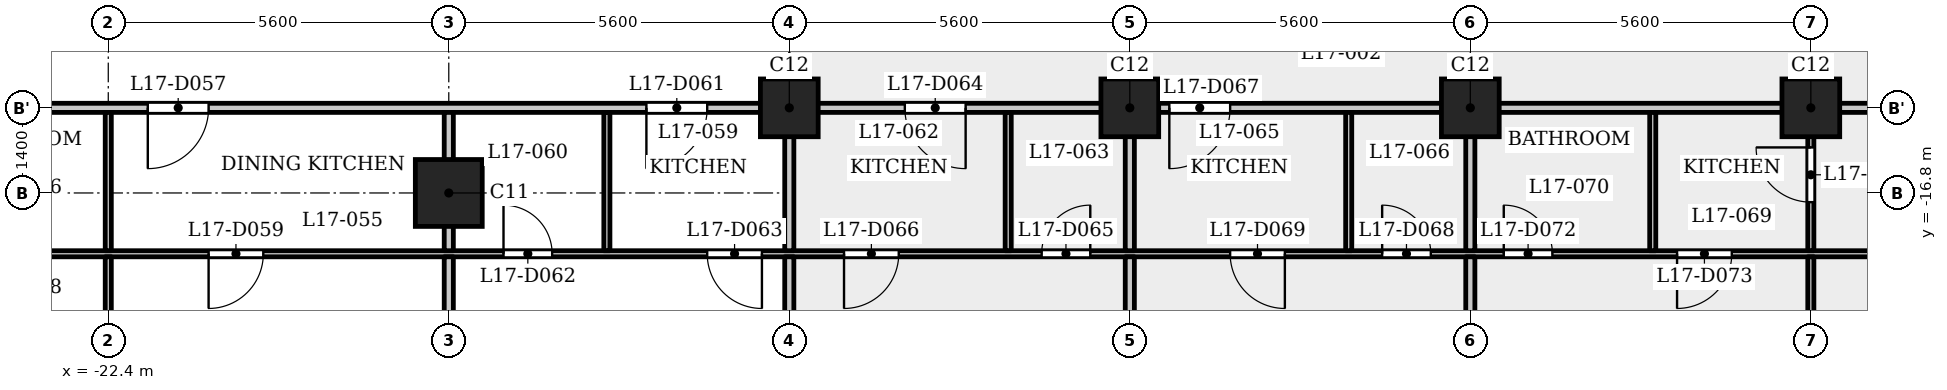
"""IFC4 building model, lengths in metres.
Left out: names, types, materials, properties, quantities, classifications, styles, units other than length and angle.
Written with IfcOpenShell. Run it as: python <this file> out.ifc"""

import sys

from ifc_helpers import new_model, si_unit, direction, frame, frame_2d, origin, origin_2d, place, context, subcontext, project, spatial, rectangle, extrude, element, fill, save


model = new_model("IFC4")
c1 = context("Model", 3, precision=1e-05, world=origin(), true_north=direction((0.0, 1.0)))
c2 = subcontext(c1, "Body", "Model", "MODEL_VIEW")
j1 = project(units=[si_unit("LENGTHUNIT", "METRE"), si_unit("PLANEANGLEUNIT", "RADIAN")], contexts=[c1])
p1 = place(None, origin())
s1 = spatial("IfcSite", under=j1, at=p1, CompositionType="ELEMENT")
p2 = place(p1, origin())
s2 = spatial("IfcBuilding", under=s1, at=p2, CompositionType="ELEMENT")
p3 = place(p2, frame((0.0, 0.0, 69.0)))
s3 = spatial("IfcBuildingStorey", under=s2, at=p3, CompositionType="ELEMENT", Elevation=69.0)
p4 = place(p3, frame((-16.8, -16.8, 0.0), z_axis=(0.0, 0.0, 1.0), x_axis=(1.0, 0.0, 0.0)))
e1 = element("IfcColumn", 1, at=p4, inside=s3, PredefinedType="COLUMN", context=c2, shape_type="SweptSolid", body=[
    extrude(rectangle(XDim=1.1, YDim=1.1, at=origin_2d()), origin(), (0.0, 0.0, 1.0), 3.5),
])
for number, where, z_axis, x_axis in (
    (2, (-11.2, -15.4, 0.0), (0.0, 0.0, 1.0), (1.0, 0.0, 0.0)),
    (3, (-5.6, -15.4, 0.0), (0.0, 0.0, 1.0), (1.0, 0.0, 0.0)),
    (4, (0.0, -15.4, 0.0), (0.0, 0.0, 1.0), (1.0, 0.0, 0.0)),
    (5, (5.6, -15.4, 0.0), (0.0, 0.0, 1.0), (1.0, 0.0, 0.0)),
):
    element("IfcColumn", number, at=place(p3, frame(where, z_axis=z_axis, x_axis=x_axis)), inside=s3, PredefinedType="COLUMN", context=c2, shape_type="SweptSolid", body=[
        extrude(rectangle(XDim=0.95, YDim=0.95, at=origin_2d()), origin(), (0.0, 0.0, 1.0), 3.5),
    ])
p5 = place(p3, frame((-26.394, -17.8, 0.0), z_axis=(0.0, 0.0, 1.0), x_axis=(1.0, 0.0, 0.0)))
e6 = element("IfcWall", 6, at=p5, inside=s3, PredefinedType="PARTITIONING", context=c2, shape_type="SweptSolid", body=[
    extrude(rectangle(XDim=53.034, YDim=0.1, at=frame_2d((26.517, 0.0))), origin(), (0.0, 0.0, 1.0), 3.15),
])
p6 = place(p5, frame((0.794, 0.0, 0.0)))
e7 = element("IfcOpeningElement", 7, at=p6, cuts=e6, PredefinedType="OPENING", context=c2, shape_type="SweptSolid", body=[
    extrude(rectangle(XDim=0.8, YDim=2.1, at=frame_2d((0.4, 1.05))), frame((0.0, 0.06, 0.0), z_axis=(0.0, -1.0, 0.0), x_axis=(1.0, 0.0, 0.0)), (0.0, 0.0, 1.0), 0.12),
])
p7 = place(p5, frame((5.644, 0.0, 0.0)))
e8 = element("IfcOpeningElement", 8, at=p7, cuts=e6, PredefinedType="OPENING", context=c2, shape_type="SweptSolid", body=[
    extrude(rectangle(XDim=0.9, YDim=2.1, at=frame_2d((0.45, 1.05))), frame((0.0, 0.06, 0.0), z_axis=(0.0, -1.0, 0.0), x_axis=(1.0, 0.0, 0.0)), (0.0, 0.0, 1.0), 0.12),
])
p8 = place(p5, frame((10.494, 0.0, 0.0)))
e9 = element("IfcOpeningElement", 9, at=p8, cuts=e6, PredefinedType="OPENING", context=c2, shape_type="SweptSolid", body=[
    extrude(rectangle(XDim=0.8, YDim=2.1, at=frame_2d((0.4, 1.05))), frame((0.0, 0.06, 0.0), z_axis=(0.0, -1.0, 0.0), x_axis=(1.0, 0.0, 0.0)), (0.0, 0.0, 1.0), 0.12),
])
p9 = place(p5, frame((13.844, 0.0, 0.0)))
e10 = element("IfcOpeningElement", 10, at=p9, cuts=e6, PredefinedType="OPENING", context=c2, shape_type="SweptSolid", body=[
    extrude(rectangle(XDim=0.9, YDim=2.1, at=frame_2d((0.45, 1.05))), frame((0.0, 0.06, 0.0), z_axis=(0.0, -1.0, 0.0), x_axis=(1.0, 0.0, 0.0)), (0.0, 0.0, 1.0), 0.12),
])
p10 = place(p5, frame((19.344, 0.0, 0.0)))
e11 = element("IfcOpeningElement", 11, at=p10, cuts=e6, PredefinedType="OPENING", context=c2, shape_type="SweptSolid", body=[
    extrude(rectangle(XDim=0.8, YDim=2.1, at=frame_2d((0.4, 1.05))), frame((0.0, 0.06, 0.0), z_axis=(0.0, -1.0, 0.0), x_axis=(1.0, 0.0, 0.0)), (0.0, 0.0, 1.0), 0.12),
])
p11 = place(p5, frame((16.094, 0.0, 0.0)))
e12 = element("IfcOpeningElement", 12, at=p11, cuts=e6, PredefinedType="OPENING", context=c2, shape_type="SweptSolid", body=[
    extrude(rectangle(XDim=0.9, YDim=2.1, at=frame_2d((0.45, 1.05))), frame((0.0, 0.06, 0.0), z_axis=(0.0, -1.0, 0.0), x_axis=(1.0, 0.0, 0.0)), (0.0, 0.0, 1.0), 0.12),
])
p12 = place(p5, frame((24.944, 0.0, 0.0)))
e13 = element("IfcOpeningElement", 13, at=p12, cuts=e6, PredefinedType="OPENING", context=c2, shape_type="SweptSolid", body=[
    extrude(rectangle(XDim=0.8, YDim=2.1, at=frame_2d((0.4, 1.05))), frame((0.0, 0.06, 0.0), z_axis=(0.0, -1.0, 0.0), x_axis=(1.0, 0.0, 0.0)), (0.0, 0.0, 1.0), 0.12),
])
p13 = place(p5, frame((22.444, 0.0, 0.0)))
e14 = element("IfcOpeningElement", 14, at=p13, cuts=e6, PredefinedType="OPENING", context=c2, shape_type="SweptSolid", body=[
    extrude(rectangle(XDim=0.9, YDim=2.1, at=frame_2d((0.45, 1.05))), frame((0.0, 0.06, 0.0), z_axis=(0.0, -1.0, 0.0), x_axis=(1.0, 0.0, 0.0)), (0.0, 0.0, 1.0), 0.12),
])
p14 = place(p5, frame((26.944, 0.0, 0.0)))
e15 = element("IfcOpeningElement", 15, at=p14, cuts=e6, PredefinedType="OPENING", context=c2, shape_type="SweptSolid", body=[
    extrude(rectangle(XDim=0.8, YDim=2.1, at=frame_2d((0.4, 1.05))), frame((0.0, 0.06, 0.0), z_axis=(0.0, -1.0, 0.0), x_axis=(1.0, 0.0, 0.0)), (0.0, 0.0, 1.0), 0.12),
])
p15 = place(p5, frame((29.794, 0.0, 0.0)))
e16 = element("IfcOpeningElement", 16, at=p15, cuts=e6, PredefinedType="OPENING", context=c2, shape_type="SweptSolid", body=[
    extrude(rectangle(XDim=0.9, YDim=2.1, at=frame_2d((0.45, 1.05))), frame((0.0, 0.06, 0.0), z_axis=(0.0, -1.0, 0.0), x_axis=(1.0, 0.0, 0.0)), (0.0, 0.0, 1.0), 0.12),
])
p16 = place(p5, frame((33.394, 0.0, 0.0)))
e17 = element("IfcOpeningElement", 17, at=p16, cuts=e6, PredefinedType="OPENING", context=c2, shape_type="SweptSolid", body=[
    extrude(rectangle(XDim=0.9, YDim=2.1, at=frame_2d((0.45, 1.05))), frame((0.0, 0.06, 0.0), z_axis=(0.0, -1.0, 0.0), x_axis=(1.0, 0.0, 0.0)), (0.0, 0.0, 1.0), 0.12),
])
p17 = place(p5, frame((34.944, 0.0, 0.0)))
e18 = element("IfcOpeningElement", 18, at=p17, cuts=e6, PredefinedType="OPENING", context=c2, shape_type="SweptSolid", body=[
    extrude(rectangle(XDim=0.9, YDim=2.1, at=frame_2d((0.45, 1.05))), frame((0.0, 0.06, 0.0), z_axis=(0.0, -1.0, 0.0), x_axis=(1.0, 0.0, 0.0)), (0.0, 0.0, 1.0), 0.12),
])
p18 = place(p5, frame((38.144, 0.0, 0.0)))
e19 = element("IfcOpeningElement", 19, at=p18, cuts=e6, PredefinedType="OPENING", context=c2, shape_type="SweptSolid", body=[
    extrude(rectangle(XDim=0.8, YDim=2.1, at=frame_2d((0.4, 1.05))), frame((0.0, 0.06, 0.0), z_axis=(0.0, -1.0, 0.0), x_axis=(1.0, 0.0, 0.0)), (0.0, 0.0, 1.0), 0.12),
])
p19 = place(p5, frame((40.244, 0.0, 0.0)))
e20 = element("IfcOpeningElement", 20, at=p19, cuts=e6, PredefinedType="OPENING", context=c2, shape_type="SweptSolid", body=[
    extrude(rectangle(XDim=0.9, YDim=2.1, at=frame_2d((0.45, 1.05))), frame((0.0, 0.06, 0.0), z_axis=(0.0, -1.0, 0.0), x_axis=(1.0, 0.0, 0.0)), (0.0, 0.0, 1.0), 0.12),
])
p20 = place(p5, frame((49.362, 0.0, 0.0)))
e21 = element("IfcOpeningElement", 21, at=p20, cuts=e6, PredefinedType="OPENING", context=c2, shape_type="SweptSolid", body=[
    extrude(rectangle(XDim=0.8, YDim=2.1, at=frame_2d((0.4, 1.05))), frame((0.0, 0.06, 0.0), z_axis=(0.0, -1.0, 0.0), x_axis=(1.0, 0.0, 0.0)), (0.0, 0.0, 1.0), 0.12),
])
p21 = place(p5, frame((45.094, 0.0, 0.0)))
e22 = element("IfcOpeningElement", 22, at=p21, cuts=e6, PredefinedType="OPENING", context=c2, shape_type="SweptSolid", body=[
    extrude(rectangle(XDim=0.9, YDim=2.1, at=frame_2d((0.45, 1.05))), frame((0.0, 0.06, 0.0), z_axis=(0.0, -1.0, 0.0), x_axis=(1.0, 0.0, 0.0)), (0.0, 0.0, 1.0), 0.12),
])
p22 = place(p3, frame((-27.484, -15.4, 0.0), z_axis=(0.0, 0.0, 1.0), x_axis=(1.0, 0.0, 0.0)))
e23 = element("IfcWall", 23, at=p22, inside=s3, PredefinedType="PARTITIONING", context=c2, shape_type="SweptSolid", body=[
    extrude(rectangle(XDim=54.968, YDim=0.15, at=frame_2d((27.484, 0.0))), origin(), (0.0, 0.0, 1.0), 3.15),
])
p23 = place(p22, frame((5.734, 0.0, 0.0)))
e24 = element("IfcOpeningElement", 24, at=p23, cuts=e23, PredefinedType="OPENING", context=c2, shape_type="SweptSolid", body=[
    extrude(rectangle(XDim=1.0, YDim=2.1, at=frame_2d((0.5, 1.05))), frame((0.0, 0.085, 0.0), z_axis=(0.0, -1.0, 0.0), x_axis=(1.0, 0.0, 0.0)), (0.0, 0.0, 1.0), 0.17),
])
p24 = place(p22, frame((13.934, 0.0, 0.0)))
e25 = element("IfcOpeningElement", 25, at=p24, cuts=e23, PredefinedType="OPENING", context=c2, shape_type="SweptSolid", body=[
    extrude(rectangle(XDim=1.0, YDim=2.1, at=frame_2d((0.5, 1.05))), frame((0.0, 0.085, 0.0), z_axis=(0.0, -1.0, 0.0), x_axis=(1.0, 0.0, 0.0)), (0.0, 0.0, 1.0), 0.17),
])
p25 = place(p22, frame((18.184, 0.0, 0.0)))
e26 = element("IfcOpeningElement", 26, at=p25, cuts=e23, PredefinedType="OPENING", context=c2, shape_type="SweptSolid", body=[
    extrude(rectangle(XDim=1.0, YDim=2.1, at=frame_2d((0.5, 1.05))), frame((0.0, 0.085, 0.0), z_axis=(0.0, -1.0, 0.0), x_axis=(1.0, 0.0, 0.0)), (0.0, 0.0, 1.0), 0.17),
])
p26 = place(p22, frame((22.534, 0.0, 0.0)))
e27 = element("IfcOpeningElement", 27, at=p26, cuts=e23, PredefinedType="OPENING", context=c2, shape_type="SweptSolid", body=[
    extrude(rectangle(XDim=1.0, YDim=2.1, at=frame_2d((0.5, 1.05))), frame((0.0, 0.085, 0.0), z_axis=(0.0, -1.0, 0.0), x_axis=(1.0, 0.0, 0.0)), (0.0, 0.0, 1.0), 0.17),
])
p27 = place(p22, frame((36.984, 0.0, 0.0)))
e28 = element("IfcOpeningElement", 28, at=p27, cuts=e23, PredefinedType="OPENING", context=c2, shape_type="SweptSolid", body=[
    extrude(rectangle(XDim=1.0, YDim=2.1, at=frame_2d((0.5, 1.05))), frame((0.0, 0.085, 0.0), z_axis=(0.0, -1.0, 0.0), x_axis=(1.0, 0.0, 0.0)), (0.0, 0.0, 1.0), 0.17),
])
p28 = place(p22, frame((42.334, 0.0, 0.0)))
e29 = element("IfcOpeningElement", 29, at=p28, cuts=e23, PredefinedType="OPENING", context=c2, shape_type="SweptSolid", body=[
    extrude(rectangle(XDim=1.0, YDim=2.1, at=frame_2d((0.5, 1.05))), frame((0.0, 0.085, 0.0), z_axis=(0.0, -1.0, 0.0), x_axis=(1.0, 0.0, 0.0)), (0.0, 0.0, 1.0), 0.17),
])
p29 = place(p22, frame((45.184, 0.0, 0.0)))
e30 = element("IfcOpeningElement", 30, at=p29, cuts=e23, PredefinedType="OPENING", context=c2, shape_type="SweptSolid", body=[
    extrude(rectangle(XDim=1.0, YDim=2.1, at=frame_2d((0.5, 1.05))), frame((0.0, 0.085, 0.0), z_axis=(0.0, -1.0, 0.0), x_axis=(1.0, 0.0, 0.0)), (0.0, 0.0, 1.0), 0.17),
])
p30 = place(p3, frame((-22.4, -21.72, 0.0), z_axis=(0.0, 0.0, 1.0), x_axis=(0.0, 1.0, 0.0)))
e31 = element("IfcWall", 31, at=p30, inside=s3, PredefinedType="PARTITIONING", context=c2, shape_type="SweptSolid", body=[
    extrude(rectangle(XDim=3.87, YDim=0.1, at=frame_2d((1.935, 0.0))), origin(), (0.0, 0.0, 1.0), 3.15),
])
p31 = place(p30, frame((1.87, 0.0, 0.0)))
e32 = element("IfcOpeningElement", 32, at=p31, cuts=e31, PredefinedType="OPENING", context=c2, shape_type="SweptSolid", body=[
    extrude(rectangle(XDim=0.9, YDim=2.1, at=frame_2d((0.45, 1.05))), frame((0.0, 0.06, 0.0), z_axis=(0.0, -1.0, 0.0), x_axis=(1.0, 0.0, 0.0)), (0.0, 0.0, 1.0), 0.12),
])
p32 = place(p3, frame((-22.4, -17.75, 0.0), z_axis=(0.0, 0.0, 1.0), x_axis=(0.0, 1.0, 0.0)))
e33 = element("IfcWall", 33, at=p32, inside=s3, PredefinedType="PARTITIONING", context=c2, shape_type="SweptSolid", body=[
    extrude(rectangle(XDim=2.275, YDim=0.1, at=frame_2d((1.137, 0.0))), origin(), (0.0, 0.0, 1.0), 3.15),
])
p33 = place(p3, frame((-16.8, -23.08, 0.0), z_axis=(0.0, 0.0, 1.0), x_axis=(0.0, 1.0, 0.0)))
e34 = element("IfcWall", 34, at=p33, inside=s3, PredefinedType="PARTITIONING", context=c2, shape_type="SweptSolid", body=[
    extrude(rectangle(XDim=5.23, YDim=0.15, at=frame_2d((2.615, 0.0))), origin(), (0.0, 0.0, 1.0), 3.15),
])
p34 = place(p3, frame((-16.8, -17.75, 0.0), z_axis=(0.0, 0.0, 1.0), x_axis=(0.0, 1.0, 0.0)))
e35 = element("IfcWall", 35, at=p34, inside=s3, PredefinedType="PARTITIONING", context=c2, shape_type="SweptSolid", body=[
    extrude(rectangle(XDim=2.275, YDim=0.15, at=frame_2d((1.137, 0.0))), origin(), (0.0, 0.0, 1.0), 3.15),
])
p35 = place(p3, frame((-14.2, -17.75, 0.0), z_axis=(0.0, 0.0, 1.0), x_axis=(0.0, 1.0, 0.0)))
e36 = element("IfcWall", 36, at=p35, inside=s3, PredefinedType="PARTITIONING", context=c2, shape_type="SweptSolid", body=[
    extrude(rectangle(XDim=2.275, YDim=0.1, at=frame_2d((1.137, 0.0))), origin(), (0.0, 0.0, 1.0), 3.15),
])
p36 = place(p3, frame((-11.2, -23.08, 0.0), z_axis=(0.0, 0.0, 1.0), x_axis=(0.0, 1.0, 0.0)))
e37 = element("IfcWall", 37, at=p36, inside=s3, PredefinedType="PARTITIONING", context=c2, shape_type="SweptSolid", body=[
    extrude(rectangle(XDim=5.23, YDim=0.15, at=frame_2d((2.615, 0.0))), origin(), (0.0, 0.0, 1.0), 3.15),
])
p37 = place(p3, frame((-11.2, -17.75, 0.0), z_axis=(0.0, 0.0, 1.0), x_axis=(0.0, 1.0, 0.0)))
e38 = element("IfcWall", 38, at=p37, inside=s3, PredefinedType="PARTITIONING", context=c2, shape_type="SweptSolid", body=[
    extrude(rectangle(XDim=2.275, YDim=0.15, at=frame_2d((1.137, 0.0))), origin(), (0.0, 0.0, 1.0), 3.15),
])
p38 = place(p3, frame((-7.6, -17.75, 0.0), z_axis=(0.0, 0.0, 1.0), x_axis=(0.0, 1.0, 0.0)))
e39 = element("IfcWall", 39, at=p38, inside=s3, PredefinedType="PARTITIONING", context=c2, shape_type="SweptSolid", body=[
    extrude(rectangle(XDim=2.275, YDim=0.1, at=frame_2d((1.137, 0.0))), origin(), (0.0, 0.0, 1.0), 3.15),
])
p39 = place(p3, frame((-5.6, -23.08, 0.0), z_axis=(0.0, 0.0, 1.0), x_axis=(0.0, 1.0, 0.0)))
e40 = element("IfcWall", 40, at=p39, inside=s3, PredefinedType="PARTITIONING", context=c2, shape_type="SweptSolid", body=[
    extrude(rectangle(XDim=5.23, YDim=0.15, at=frame_2d((2.615, 0.0))), origin(), (0.0, 0.0, 1.0), 3.15),
])
p40 = place(p3, frame((-5.6, -17.75, 0.0), z_axis=(0.0, 0.0, 1.0), x_axis=(0.0, 1.0, 0.0)))
e41 = element("IfcWall", 41, at=p40, inside=s3, PredefinedType="PARTITIONING", context=c2, shape_type="SweptSolid", body=[
    extrude(rectangle(XDim=2.275, YDim=0.15, at=frame_2d((1.137, 0.0))), origin(), (0.0, 0.0, 1.0), 3.15),
])
p41 = place(p3, frame((-2.0, -17.75, 0.0), z_axis=(0.0, 0.0, 1.0), x_axis=(0.0, 1.0, 0.0)))
e42 = element("IfcWall", 42, at=p41, inside=s3, PredefinedType="PARTITIONING", context=c2, shape_type="SweptSolid", body=[
    extrude(rectangle(XDim=2.275, YDim=0.1, at=frame_2d((1.137, 0.0))), origin(), (0.0, 0.0, 1.0), 3.15),
])
p42 = place(p3, frame((0.0, -23.08, 0.0), z_axis=(0.0, 0.0, 1.0), x_axis=(0.0, 1.0, 0.0)))
e43 = element("IfcWall", 43, at=p42, inside=s3, PredefinedType="PARTITIONING", context=c2, shape_type="SweptSolid", body=[
    extrude(rectangle(XDim=5.23, YDim=0.15, at=frame_2d((2.615, 0.0))), origin(), (0.0, 0.0, 1.0), 3.15),
])
p43 = place(p3, frame((0.0, -17.75, 0.0), z_axis=(0.0, 0.0, 1.0), x_axis=(0.0, 1.0, 0.0)))
e44 = element("IfcWall", 44, at=p43, inside=s3, PredefinedType="PARTITIONING", context=c2, shape_type="SweptSolid", body=[
    extrude(rectangle(XDim=2.275, YDim=0.15, at=frame_2d((1.137, 0.0))), origin(), (0.0, 0.0, 1.0), 3.15),
])
p44 = place(p3, frame((3.0, -17.75, 0.0), z_axis=(0.0, 0.0, 1.0), x_axis=(0.0, 1.0, 0.0)))
e45 = element("IfcWall", 45, at=p44, inside=s3, PredefinedType="PARTITIONING", context=c2, shape_type="SweptSolid", body=[
    extrude(rectangle(XDim=2.275, YDim=0.1, at=frame_2d((1.137, 0.0))), origin(), (0.0, 0.0, 1.0), 3.15),
])
p45 = place(p3, frame((5.6, -23.08, 0.0), z_axis=(0.0, 0.0, 1.0), x_axis=(0.0, 1.0, 0.0)))
e46 = element("IfcWall", 46, at=p45, inside=s3, PredefinedType="PARTITIONING", context=c2, shape_type="SweptSolid", body=[
    extrude(rectangle(XDim=5.23, YDim=0.1, at=frame_2d((2.615, 0.0))), origin(), (0.0, 0.0, 1.0), 3.15),
])
p46 = place(p3, frame((5.6, -17.75, 0.0), z_axis=(0.0, 0.0, 1.0), x_axis=(0.0, 1.0, 0.0)))
e47 = element("IfcWall", 47, at=p46, inside=s3, PredefinedType="PARTITIONING", context=c2, shape_type="SweptSolid", body=[
    extrude(rectangle(XDim=2.275, YDim=0.1, at=frame_2d((1.137, 0.0))), origin(), (0.0, 0.0, 1.0), 3.15),
])
p47 = place(p46, frame((0.799, 0.0, 0.0)))
e48 = element("IfcOpeningElement", 48, at=p47, cuts=e47, PredefinedType="OPENING", context=c2, shape_type="SweptSolid", body=[
    extrude(rectangle(XDim=0.9, YDim=2.1, at=frame_2d((0.45, 1.05))), frame((0.0, 0.06, 0.0), z_axis=(0.0, -1.0, 0.0), x_axis=(1.0, 0.0, 0.0)), (0.0, 0.0, 1.0), 0.12),
])
p48 = place(p23, origin())
e49 = element("IfcDoor", 49, at=p48, inside=s3, OperationType="SINGLE_SWING_LEFT", PredefinedType="DOOR", context=c2, shape_type="SweptSolid", body=[
    extrude(rectangle(XDim=1.0, YDim=2.1, at=frame_2d((0.5, 1.05))), frame((0.0, 0.025, 0.0), z_axis=(0.0, -1.0, 0.0), x_axis=(1.0, 0.0, 0.0)), (0.0, 0.0, 1.0), 0.05),
])
fill(e24, e49)
p49 = place(p7, origin())
e50 = element("IfcDoor", 50, at=p49, inside=s3, OperationType="SINGLE_SWING_LEFT", PredefinedType="DOOR", context=c2, shape_type="SweptSolid", body=[
    extrude(rectangle(XDim=0.9, YDim=2.1, at=frame_2d((0.45, 1.05))), frame((0.0, 0.025, 0.0), z_axis=(0.0, -1.0, 0.0), x_axis=(1.0, 0.0, 0.0)), (0.0, 0.0, 1.0), 0.05),
])
fill(e8, e50)
p50 = place(p24, origin())
e51 = element("IfcDoor", 51, at=p50, inside=s3, OperationType="SINGLE_SWING_LEFT", PredefinedType="DOOR", context=c2, shape_type="SweptSolid", body=[
    extrude(rectangle(XDim=1.0, YDim=2.1, at=frame_2d((0.5, 1.05))), frame((0.0, 0.025, 0.0), z_axis=(0.0, -1.0, 0.0), x_axis=(1.0, 0.0, 0.0)), (0.0, 0.0, 1.0), 0.05),
])
fill(e25, e51)
p51 = place(p8, origin())
e52 = element("IfcDoor", 52, at=p51, inside=s3, OperationType="SINGLE_SWING_RIGHT", PredefinedType="DOOR", context=c2, shape_type="SweptSolid", body=[
    extrude(rectangle(XDim=0.8, YDim=2.1, at=frame_2d((0.4, 1.05))), frame((0.0, 0.025, 0.0), z_axis=(0.0, -1.0, 0.0), x_axis=(1.0, 0.0, 0.0)), (0.0, 0.0, 1.0), 0.05),
])
fill(e9, e52)
p52 = place(p9, origin())
e53 = element("IfcDoor", 53, at=p52, inside=s3, OperationType="SINGLE_SWING_RIGHT", PredefinedType="DOOR", context=c2, shape_type="SweptSolid", body=[
    extrude(rectangle(XDim=0.9, YDim=2.1, at=frame_2d((0.45, 1.05))), frame((0.0, 0.025, 0.0), z_axis=(0.0, -1.0, 0.0), x_axis=(1.0, 0.0, 0.0)), (0.0, 0.0, 1.0), 0.05),
])
fill(e10, e53)
p53 = place(p25, origin())
e54 = element("IfcDoor", 54, at=p53, inside=s3, OperationType="SINGLE_SWING_RIGHT", PredefinedType="DOOR", context=c2, shape_type="SweptSolid", body=[
    extrude(rectangle(XDim=1.0, YDim=2.1, at=frame_2d((0.5, 1.05))), frame((0.0, 0.025, 0.0), z_axis=(0.0, -1.0, 0.0), x_axis=(1.0, 0.0, 0.0)), (0.0, 0.0, 1.0), 0.05),
])
fill(e26, e54)
p54 = place(p10, origin())
e55 = element("IfcDoor", 55, at=p54, inside=s3, OperationType="SINGLE_SWING_LEFT", PredefinedType="DOOR", context=c2, shape_type="SweptSolid", body=[
    extrude(rectangle(XDim=0.8, YDim=2.1, at=frame_2d((0.4, 1.05))), frame((0.0, 0.025, 0.0), z_axis=(0.0, -1.0, 0.0), x_axis=(1.0, 0.0, 0.0)), (0.0, 0.0, 1.0), 0.05),
])
fill(e11, e55)
p55 = place(p11, origin())
e56 = element("IfcDoor", 56, at=p55, inside=s3, OperationType="SINGLE_SWING_LEFT", PredefinedType="DOOR", context=c2, shape_type="SweptSolid", body=[
    extrude(rectangle(XDim=0.9, YDim=2.1, at=frame_2d((0.45, 1.05))), frame((0.0, 0.025, 0.0), z_axis=(0.0, -1.0, 0.0), x_axis=(1.0, 0.0, 0.0)), (0.0, 0.0, 1.0), 0.05),
])
fill(e12, e56)
p56 = place(p26, origin())
e57 = element("IfcDoor", 57, at=p56, inside=s3, OperationType="SINGLE_SWING_LEFT", PredefinedType="DOOR", context=c2, shape_type="SweptSolid", body=[
    extrude(rectangle(XDim=1.0, YDim=2.1, at=frame_2d((0.5, 1.05))), frame((0.0, 0.025, 0.0), z_axis=(0.0, -1.0, 0.0), x_axis=(1.0, 0.0, 0.0)), (0.0, 0.0, 1.0), 0.05),
])
fill(e27, e57)
p57 = place(p12, origin())
e58 = element("IfcDoor", 58, at=p57, inside=s3, OperationType="SINGLE_SWING_RIGHT", PredefinedType="DOOR", context=c2, shape_type="SweptSolid", body=[
    extrude(rectangle(XDim=0.8, YDim=2.1, at=frame_2d((0.4, 1.05))), frame((0.0, 0.025, 0.0), z_axis=(0.0, -1.0, 0.0), x_axis=(1.0, 0.0, 0.0)), (0.0, 0.0, 1.0), 0.05),
])
fill(e13, e58)
p58 = place(p13, origin())
e59 = element("IfcDoor", 59, at=p58, inside=s3, OperationType="SINGLE_SWING_RIGHT", PredefinedType="DOOR", context=c2, shape_type="SweptSolid", body=[
    extrude(rectangle(XDim=0.9, YDim=2.1, at=frame_2d((0.45, 1.05))), frame((0.0, 0.025, 0.0), z_axis=(0.0, -1.0, 0.0), x_axis=(1.0, 0.0, 0.0)), (0.0, 0.0, 1.0), 0.05),
])
fill(e14, e59)
p59 = place(p47, origin())
e60 = element("IfcDoor", 60, at=p59, inside=s3, OperationType="SINGLE_SWING_LEFT", PredefinedType="DOOR", context=c2, shape_type="SweptSolid", body=[
    extrude(rectangle(XDim=0.9, YDim=2.1, at=frame_2d((0.45, 1.05))), frame((0.0, 0.025, 0.0), z_axis=(0.0, -1.0, 0.0), x_axis=(1.0, 0.0, 0.0)), (0.0, 0.0, 1.0), 0.05),
])
fill(e48, e60)
p60 = place(p14, origin())
e61 = element("IfcDoor", 61, at=p60, inside=s3, OperationType="SINGLE_SWING_RIGHT", PredefinedType="DOOR", context=c2, shape_type="SweptSolid", body=[
    extrude(rectangle(XDim=0.8, YDim=2.1, at=frame_2d((0.4, 1.05))), frame((0.0, 0.025, 0.0), z_axis=(0.0, -1.0, 0.0), x_axis=(1.0, 0.0, 0.0)), (0.0, 0.0, 1.0), 0.05),
])
fill(e15, e61)
p61 = place(p15, origin())
e62 = element("IfcDoor", 62, at=p61, inside=s3, OperationType="SINGLE_SWING_LEFT", PredefinedType="DOOR", context=c2, shape_type="SweptSolid", body=[
    extrude(rectangle(XDim=0.9, YDim=2.1, at=frame_2d((0.45, 1.05))), frame((0.0, 0.025, 0.0), z_axis=(0.0, -1.0, 0.0), x_axis=(1.0, 0.0, 0.0)), (0.0, 0.0, 1.0), 0.05),
])
fill(e16, e62)
save(model, sys.argv[1])
